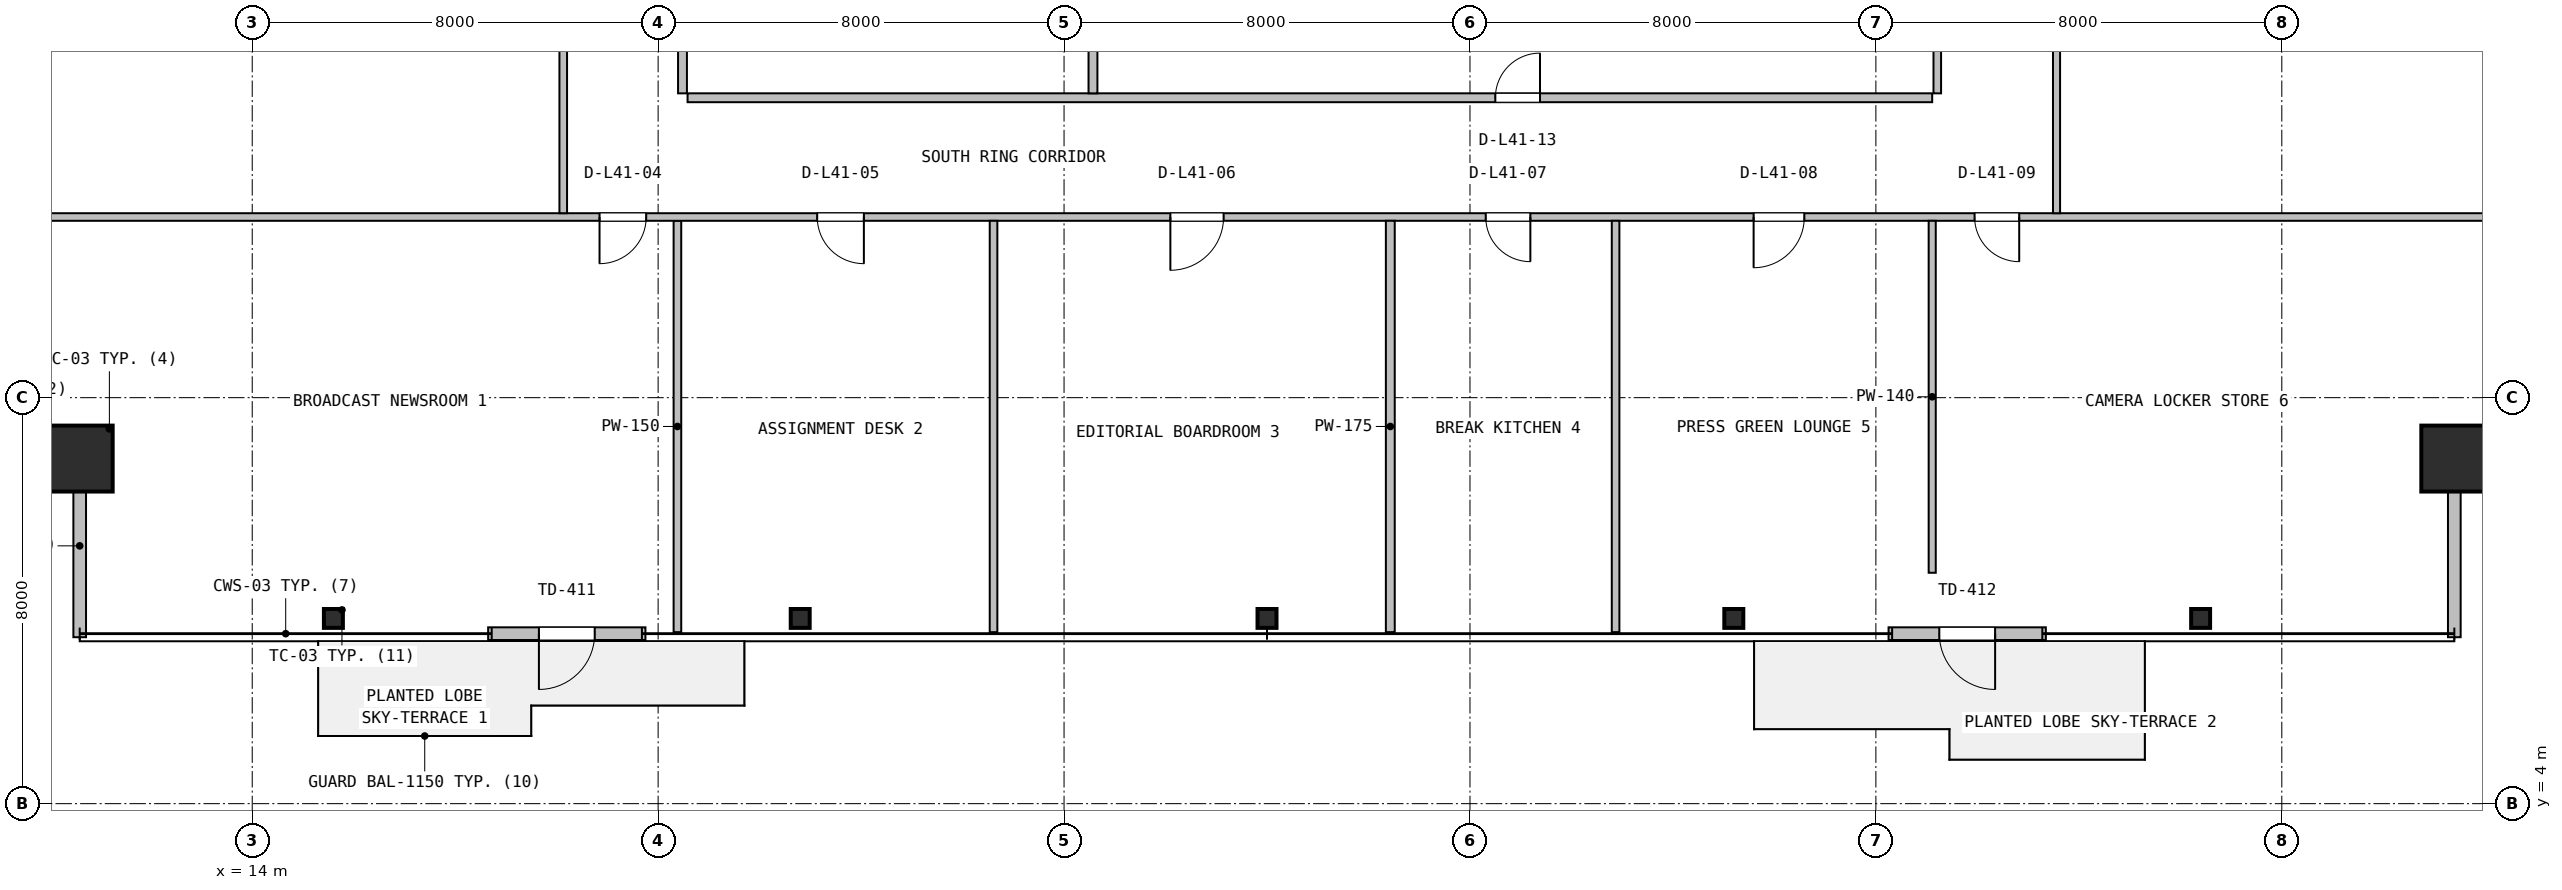
"""IFC4 building model, lengths in metres.
Left out: names, types, materials, properties, quantities, classifications, styles, units other than length and angle.
Written with IfcOpenShell. Run it as: python <this file> out.ifc"""

import sys

from ifc_helpers import new_model, si_unit, direction, frame, frame_2d, origin, origin_2d, place, context, subcontext, project, spatial, rectangle, hollow_rectangle, i_section, extrude, source, transform, mapped, element, fill, save


model = new_model("IFC4")
c1 = context("Model", 3, precision=1e-05, world=origin(), true_north=direction((0.0, 1.0)))
c2 = subcontext(c1, "Body", "Model", "MODEL_VIEW")
j1 = project(units=[si_unit("LENGTHUNIT", "METRE"), si_unit("PLANEANGLEUNIT", "RADIAN")], contexts=[c1])
p1 = place(None, origin())
s1 = spatial("IfcSite", under=j1, at=p1, CompositionType="ELEMENT")
p2 = place(p1, origin())
s2 = spatial("IfcBuilding", under=s1, at=p2, CompositionType="ELEMENT")
p3 = place(p2, frame((0.0, 0.0, 168.6)))
s3 = spatial("IfcBuildingStorey", under=s2, at=p3, CompositionType="ELEMENT", Elevation=168.6)
m1 = source(origin(), c2, "Body", "SweptSolid", [
    extrude(hollow_rectangle(XDim=1.3, YDim=1.3, WallThickness=0.05, at=origin_2d()), origin(), (0.0, 0.0, 1.0), 3.8),
])
for number, where, z_axis, x_axis in (
    (1, (10.6, 10.8, 0.0), (0.0, 0.0, 1.0), (1.0, 0.0, 0.0)),
    (2, (57.4, 10.8, 0.0), (0.0, 0.0, 1.0), (1.0, 0.0, 0.0)),
):
    element("IfcColumn", number, at=place(p3, frame(where, z_axis=z_axis, x_axis=x_axis)), inside=s3, PredefinedType="COLUMN", context=c2, shape_type="MappedRepresentation", body=[
        mapped(m1, transform((0.0, 0.0, 0.0), x_axis=(1.0, 0.0, 0.0), y_axis=(0.0, 1.0, 0.0), z_axis=(0.0, 0.0, 1.0), scale=1.0)),
    ])
m2 = source(origin(), c2, "Body", "SweptSolid", [
    extrude(i_section(OverallWidth=0.374, OverallDepth=0.372, WebThickness=0.016, FlangeThickness=0.026, FilletRadius=0.016, at=origin_2d()), origin(), (0.0, 0.0, 1.0), 3.8),
])
for number, where, z_axis, x_axis in (
    (3, (15.6, 7.65, 0.0), (0.0, 0.0, 1.0), (1.0, 0.0, 0.0)),
    (4, (24.8, 7.65, 0.0), (0.0, 0.0, 1.0), (1.0, 0.0, 0.0)),
    (5, (34.0, 7.65, 0.0), (0.0, 0.0, 1.0), (1.0, 0.0, 0.0)),
    (6, (43.2, 7.65, 0.0), (0.0, 0.0, 1.0), (1.0, 0.0, 0.0)),
    (7, (52.4, 7.65, 0.0), (0.0, 0.0, 1.0), (1.0, 0.0, 0.0)),
):
    element("IfcColumn", number, at=place(p3, frame(where, z_axis=z_axis, x_axis=x_axis)), inside=s3, PredefinedType="COLUMN", context=c2, shape_type="MappedRepresentation", body=[
        mapped(m2, transform((0.0, 0.0, 0.0), x_axis=(1.0, 0.0, 0.0), y_axis=(0.0, 1.0, 0.0), z_axis=(0.0, 0.0, 1.0), scale=1.0)),
    ])
p4 = place(p3, frame((18.65, 7.35, 0.0), z_axis=(0.0, 0.0, 1.0), x_axis=(1.0, 0.0, 0.0)))
e8 = element("IfcWall", 8, at=p4, inside=s3, PredefinedType="SOLIDWALL", context=c2, shape_type="SweptSolid", body=[
    extrude(rectangle(XDim=3.1, YDim=0.25, at=frame_2d((1.55, 0.0))), origin(), (0.0, 0.0, 1.0), 3.53),
])
p5 = place(p4, frame((1.0, 0.0, 0.0)))
e9 = element("IfcOpeningElement", 9, at=p5, cuts=e8, PredefinedType="OPENING", context=c2, shape_type="SweptSolid", body=[
    extrude(rectangle(XDim=1.1, YDim=2.15, at=frame_2d((0.55, 1.075))), frame((0.0, 0.135, 0.0), z_axis=(0.0, -1.0, 0.0), x_axis=(1.0, 0.0, 0.0)), (0.0, 0.0, 1.0), 0.27),
])
p6 = place(p3, frame((46.25, 7.35, 0.0), z_axis=(0.0, 0.0, 1.0), x_axis=(1.0, 0.0, 0.0)))
e10 = element("IfcWall", 10, at=p6, inside=s3, PredefinedType="SOLIDWALL", context=c2, shape_type="SweptSolid", body=[
    extrude(rectangle(XDim=3.1, YDim=0.25, at=frame_2d((1.55, 0.0))), origin(), (0.0, 0.0, 1.0), 3.53),
])
p7 = place(p6, frame((1.0, 0.0, 0.0)))
e11 = element("IfcOpeningElement", 11, at=p7, cuts=e10, PredefinedType="OPENING", context=c2, shape_type="SweptSolid", body=[
    extrude(rectangle(XDim=1.1, YDim=2.15, at=frame_2d((0.55, 1.075))), frame((0.0, 0.135, 0.0), z_axis=(0.0, -1.0, 0.0), x_axis=(1.0, 0.0, 0.0)), (0.0, 0.0, 1.0), 0.27),
])
for number, where, z_axis, x_axis in (
    (12, (10.6, 7.28, 0.0), (0.0, 0.0, 1.0), (0.0, 1.0, 0.0)),
    (13, (57.4, 7.28, 0.0), (0.0, 0.0, 1.0), (0.0, 1.0, 0.0)),
):
    element("IfcWall", number, at=place(p3, frame(where, z_axis=z_axis, x_axis=x_axis)), inside=s3, PredefinedType="SOLIDWALL", context=c2, shape_type="SweptSolid", body=[
        extrude(rectangle(XDim=3.6, YDim=0.25, at=frame_2d((1.8, 0.0))), origin(), (0.0, 0.0, 1.0), 3.108),
    ])
p8 = place(p3, frame((22.38, 7.38, 0.0), z_axis=(0.0, 0.0, 1.0), x_axis=(0.0, 1.0, 0.0)))
e14 = element("IfcWall", 14, at=p8, inside=s3, PredefinedType="PARTITIONING", context=c2, shape_type="SweptSolid", body=[
    extrude(rectangle(XDim=8.105, YDim=0.15, at=frame_2d((4.053, 0.0))), origin(), (0.0, 0.0, 1.0), 3.108),
])
p9 = place(p3, frame((7.18, 15.56, 0.0), z_axis=(0.0, 0.0, 1.0), x_axis=(1.0, 0.0, 0.0)))
e15 = element("IfcWall", 15, at=p9, inside=s3, PredefinedType="PARTITIONING", context=c2, shape_type="SweptSolid", body=[
    extrude(rectangle(XDim=53.64, YDim=0.15, at=frame_2d((26.82, 0.0))), origin(), (0.0, 0.0, 1.0), 2.909),
])
p10 = place(p9, frame((13.665, 0.0, 0.0)))
e16 = element("IfcOpeningElement", 16, at=p10, cuts=e15, PredefinedType="OPENING", context=c2, shape_type="SweptSolid", body=[
    extrude(rectangle(XDim=0.92, YDim=2.08, at=frame_2d((0.46, 1.04))), frame((0.0, 0.085, 0.0), z_axis=(0.0, -1.0, 0.0), x_axis=(1.0, 0.0, 0.0)), (0.0, 0.0, 1.0), 0.17),
])
p11 = place(p9, frame((17.955, 0.0, 0.0)))
e17 = element("IfcOpeningElement", 17, at=p11, cuts=e15, PredefinedType="OPENING", context=c2, shape_type="SweptSolid", body=[
    extrude(rectangle(XDim=0.92, YDim=2.08, at=frame_2d((0.46, 1.04))), frame((0.0, 0.085, 0.0), z_axis=(0.0, -1.0, 0.0), x_axis=(1.0, 0.0, 0.0)), (0.0, 0.0, 1.0), 0.17),
])
p12 = place(p9, frame((24.915, 0.0, 0.0)))
e18 = element("IfcOpeningElement", 18, at=p12, cuts=e15, PredefinedType="OPENING", context=c2, shape_type="SweptSolid", body=[
    extrude(rectangle(XDim=1.05, YDim=2.1, at=frame_2d((0.525, 1.05))), frame((0.0, 0.085, 0.0), z_axis=(0.0, -1.0, 0.0), x_axis=(1.0, 0.0, 0.0)), (0.0, 0.0, 1.0), 0.17),
])
p13 = place(p9, frame((31.13, 0.0, 0.0)))
e19 = element("IfcOpeningElement", 19, at=p13, cuts=e15, PredefinedType="OPENING", context=c2, shape_type="SweptSolid", body=[
    extrude(rectangle(XDim=0.88, YDim=2.06, at=frame_2d((0.44, 1.03))), frame((0.0, 0.085, 0.0), z_axis=(0.0, -1.0, 0.0), x_axis=(1.0, 0.0, 0.0)), (0.0, 0.0, 1.0), 0.17),
])
p14 = place(p9, frame((36.41, 0.0, 0.0)))
e20 = element("IfcOpeningElement", 20, at=p14, cuts=e15, PredefinedType="OPENING", context=c2, shape_type="SweptSolid", body=[
    extrude(rectangle(XDim=1.0, YDim=2.1, at=frame_2d((0.5, 1.05))), frame((0.0, 0.085, 0.0), z_axis=(0.0, -1.0, 0.0), x_axis=(1.0, 0.0, 0.0)), (0.0, 0.0, 1.0), 0.17),
])
p15 = place(p9, frame((40.765, 0.0, 0.0)))
e21 = element("IfcOpeningElement", 21, at=p15, cuts=e15, PredefinedType="OPENING", context=c2, shape_type="SweptSolid", body=[
    extrude(rectangle(XDim=0.88, YDim=2.06, at=frame_2d((0.44, 1.03))), frame((0.0, 0.085, 0.0), z_axis=(0.0, -1.0, 0.0), x_axis=(1.0, 0.0, 0.0)), (0.0, 0.0, 1.0), 0.17),
])
p16 = place(p3, frame((28.61, 7.38, 0.0), z_axis=(0.0, 0.0, 1.0), x_axis=(0.0, 1.0, 0.0)))
e22 = element("IfcWall", 22, at=p16, inside=s3, PredefinedType="PARTITIONING", context=c2, shape_type="SweptSolid", body=[
    extrude(rectangle(XDim=8.105, YDim=0.15, at=frame_2d((4.053, 0.0))), origin(), (0.0, 0.0, 1.0), 3.108),
])
p17 = place(p3, frame((36.43, 7.38, 0.0), z_axis=(0.0, 0.0, 1.0), x_axis=(0.0, 1.0, 0.0)))
e23 = element("IfcWall", 23, at=p17, inside=s3, PredefinedType="PARTITIONING", context=c2, shape_type="SweptSolid", body=[
    extrude(rectangle(XDim=8.105, YDim=0.175, at=frame_2d((4.053, 0.0))), origin(), (0.0, 0.0, 1.0), 3.108),
])
p18 = place(p3, frame((40.87, 7.38, 0.0), z_axis=(0.0, 0.0, 1.0), x_axis=(0.0, 1.0, 0.0)))
e24 = element("IfcWall", 24, at=p18, inside=s3, PredefinedType="PARTITIONING", context=c2, shape_type="SweptSolid", body=[
    extrude(rectangle(XDim=8.105, YDim=0.15, at=frame_2d((4.053, 0.0))), origin(), (0.0, 0.0, 1.0), 3.108),
])
p19 = place(p3, frame((47.11, 8.55, 0.0), z_axis=(0.0, 0.0, 1.0), x_axis=(0.0, 1.0, 0.0)))
e25 = element("IfcWall", 25, at=p19, inside=s3, PredefinedType="PARTITIONING", context=c2, shape_type="SweptSolid", body=[
    extrude(rectangle(XDim=6.935, YDim=0.14, at=frame_2d((3.468, 0.0))), origin(), (0.0, 0.0, 1.0), 3.222),
])
p20 = place(p3, frame((20.13, 15.635, 0.0), z_axis=(0.0, 0.0, 1.0), x_axis=(0.0, 1.0, 0.0)))
e26 = element("IfcWall", 26, at=p20, inside=s3, PredefinedType="PARTITIONING", context=c2, shape_type="SweptSolid", body=[
    extrude(rectangle(XDim=17.64, YDim=0.15, at=frame_2d((8.82, 0.0))), origin(), (0.0, 0.0, 1.0), 3.222),
])
p21 = place(p20, frame((5.41, 0.0, 0.0)))
e27 = element("IfcOpeningElement", 27, at=p21, cuts=e26, PredefinedType="OPENING", context=c2, shape_type="SweptSolid", body=[
    extrude(rectangle(XDim=0.92, YDim=2.08, at=frame_2d((0.46, 1.04))), frame((0.0, 0.085, 0.0), z_axis=(0.0, -1.0, 0.0), x_axis=(1.0, 0.0, 0.0)), (0.0, 0.0, 1.0), 0.17),
])
p22 = place(p3, frame((22.58, 17.91, 0.0), z_axis=(0.0, 0.0, 1.0), x_axis=(1.0, 0.0, 0.0)))
e28 = element("IfcWall", 28, at=p22, inside=s3, PredefinedType="PARTITIONING", context=c2, shape_type="SweptSolid", body=[
    extrude(rectangle(XDim=24.53, YDim=0.175, at=frame_2d((12.265, 0.0))), origin(), (0.0, 0.0, 1.0), 2.909),
])
p23 = place(p22, frame((15.92, 0.0, 0.0)))
e29 = element("IfcOpeningElement", 29, at=p23, cuts=e28, PredefinedType="OPENING", context=c2, shape_type="SweptSolid", body=[
    extrude(rectangle(XDim=0.88, YDim=2.06, at=frame_2d((0.44, 1.03))), frame((0.0, 0.098, 0.0), z_axis=(0.0, -1.0, 0.0), x_axis=(1.0, 0.0, 0.0)), (0.0, 0.0, 1.0), 0.195),
])
p24 = place(p3, frame((30.57, 17.997, 0.0), z_axis=(0.0, 0.0, 1.0), x_axis=(0.0, 1.0, 0.0)))
e30 = element("IfcWall", 30, at=p24, inside=s3, PredefinedType="PARTITIONING", context=c2, shape_type="SweptSolid", body=[
    extrude(rectangle(XDim=15.266, YDim=0.175, at=frame_2d((7.633, 0.0))), origin(), (0.0, 0.0, 1.0), 2.909),
])
p25 = place(p3, frame((22.48, 17.997, 0.0), z_axis=(0.0, 0.0, 1.0), x_axis=(0.0, 1.0, 0.0)))
e31 = element("IfcWall", 31, at=p25, inside=s3, PredefinedType="PARTITIONING", context=c2, shape_type="SweptSolid", body=[
    extrude(rectangle(XDim=15.266, YDim=0.175, at=frame_2d((7.633, 0.0))), origin(), (0.0, 0.0, 1.0), 3.222),
])
p26 = place(p25, frame((7.108, 0.0, 0.0)))
e32 = element("IfcOpeningElement", 32, at=p26, cuts=e31, PredefinedType="OPENING", context=c2, shape_type="SweptSolid", body=[
    extrude(rectangle(XDim=1.05, YDim=2.1, at=frame_2d((0.525, 1.05))), frame((0.0, 0.098, 0.0), z_axis=(0.0, -1.0, 0.0), x_axis=(1.0, 0.0, 0.0)), (0.0, 0.0, 1.0), 0.195),
])
p27 = place(p3, frame((47.21, 17.997, 0.0), z_axis=(0.0, 0.0, 1.0), x_axis=(0.0, 1.0, 0.0)))
e33 = element("IfcWall", 33, at=p27, inside=s3, PredefinedType="PARTITIONING", context=c2, shape_type="SweptSolid", body=[
    extrude(rectangle(XDim=15.266, YDim=0.15, at=frame_2d((7.633, 0.0))), origin(), (0.0, 0.0, 1.0), 3.222),
])
p28 = place(p3, frame((49.56, 15.635, 0.0), z_axis=(0.0, 0.0, 1.0), x_axis=(0.0, 1.0, 0.0)))
e34 = element("IfcWall", 34, at=p28, inside=s3, PredefinedType="PARTITIONING", context=c2, shape_type="SweptSolid", body=[
    extrude(rectangle(XDim=17.645, YDim=0.14, at=frame_2d((8.823, 0.0))), origin(), (0.0, 0.0, 1.0), 3.222),
])
p29 = place(p28, frame((8.32, 0.0, 0.0)))
e35 = element("IfcOpeningElement", 35, at=p29, cuts=e34, PredefinedType="OPENING", context=c2, shape_type="SweptSolid", body=[
    extrude(rectangle(XDim=1.0, YDim=2.1, at=frame_2d((0.5, 1.05))), frame((0.0, 0.08, 0.0), z_axis=(0.0, -1.0, 0.0), x_axis=(1.0, 0.0, 0.0)), (0.0, 0.0, 1.0), 0.16),
])
m3 = source(origin(), c2, "Body", "SweptSolid", [
    extrude(rectangle(XDim=1.1, YDim=2.15, at=frame_2d((0.55, 1.075))), frame((0.0, 0.025, 0.0), z_axis=(0.0, -1.0, 0.0), x_axis=(1.0, 0.0, 0.0)), (0.0, 0.0, 1.0), 0.05),
])
p30 = place(p5, frame((1.1, 0.0, 0.0), z_axis=(0.0, 0.0, 1.0), x_axis=(-1.0, 0.0, 0.0)))
e36 = element("IfcDoor", 36, at=p30, inside=s3, OperationType="SINGLE_SWING_LEFT", PredefinedType="DOOR", context=c2, shape_type="MappedRepresentation", body=[
    mapped(m3, transform((0.0, 0.0, 0.0), x_axis=(1.0, 0.0, 0.0), y_axis=(0.0, 1.0, 0.0), z_axis=(0.0, 0.0, 1.0), scale=1.0)),
])
fill(e9, e36)
p31 = place(p7, frame((1.1, 0.0, 0.0), z_axis=(0.0, 0.0, 1.0), x_axis=(-1.0, 0.0, 0.0)))
e37 = element("IfcDoor", 37, at=p31, inside=s3, OperationType="SINGLE_SWING_RIGHT", PredefinedType="DOOR", context=c2, shape_type="MappedRepresentation", body=[
    mapped(m3, transform((0.0, 0.0, 0.0), x_axis=(1.0, 0.0, 0.0), y_axis=(0.0, 1.0, 0.0), z_axis=(0.0, 0.0, 1.0), scale=1.0)),
])
fill(e11, e37)
m4 = source(origin(), c2, "Body", "SweptSolid", [
    extrude(rectangle(XDim=0.92, YDim=2.08, at=frame_2d((0.46, 1.04))), frame((0.0, 0.025, 0.0), z_axis=(0.0, -1.0, 0.0), x_axis=(1.0, 0.0, 0.0)), (0.0, 0.0, 1.0), 0.05),
])
p32 = place(p10, frame((0.92, 0.0, 0.0), z_axis=(0.0, 0.0, 1.0), x_axis=(-1.0, 0.0, 0.0)))
e38 = element("IfcDoor", 38, at=p32, inside=s3, OperationType="SINGLE_SWING_LEFT", PredefinedType="DOOR", context=c2, shape_type="MappedRepresentation", body=[
    mapped(m4, transform((0.0, 0.0, 0.0), x_axis=(1.0, 0.0, 0.0), y_axis=(0.0, 1.0, 0.0), z_axis=(0.0, 0.0, 1.0), scale=1.0)),
])
fill(e16, e38)
p33 = place(p11, frame((0.92, 0.0, 0.0), z_axis=(0.0, 0.0, 1.0), x_axis=(-1.0, 0.0, 0.0)))
e39 = element("IfcDoor", 39, at=p33, inside=s3, OperationType="SINGLE_SWING_RIGHT", PredefinedType="DOOR", context=c2, shape_type="MappedRepresentation", body=[
    mapped(m4, transform((0.0, 0.0, 0.0), x_axis=(1.0, 0.0, 0.0), y_axis=(0.0, 1.0, 0.0), z_axis=(0.0, 0.0, 1.0), scale=1.0)),
])
fill(e17, e39)
m5 = source(origin(), c2, "Body", "SweptSolid", [
    extrude(rectangle(XDim=1.05, YDim=2.1, at=frame_2d((0.525, 1.05))), frame((0.0, 0.025, 0.0), z_axis=(0.0, -1.0, 0.0), x_axis=(1.0, 0.0, 0.0)), (0.0, 0.0, 1.0), 0.05),
])
p34 = place(p12, frame((1.05, 0.0, 0.0), z_axis=(0.0, 0.0, 1.0), x_axis=(-1.0, 0.0, 0.0)))
e40 = element("IfcDoor", 40, at=p34, inside=s3, OperationType="SINGLE_SWING_LEFT", PredefinedType="DOOR", context=c2, shape_type="MappedRepresentation", body=[
    mapped(m5, transform((0.0, 0.0, 0.0), x_axis=(1.0, 0.0, 0.0), y_axis=(0.0, 1.0, 0.0), z_axis=(0.0, 0.0, 1.0), scale=1.0)),
])
fill(e18, e40)
m6 = source(origin(), c2, "Body", "SweptSolid", [
    extrude(rectangle(XDim=0.88, YDim=2.06, at=frame_2d((0.44, 1.03))), frame((0.0, 0.025, 0.0), z_axis=(0.0, -1.0, 0.0), x_axis=(1.0, 0.0, 0.0)), (0.0, 0.0, 1.0), 0.05),
])
p35 = place(p13, frame((0.88, 0.0, 0.0), z_axis=(0.0, 0.0, 1.0), x_axis=(-1.0, 0.0, 0.0)))
e41 = element("IfcDoor", 41, at=p35, inside=s3, OperationType="SINGLE_SWING_RIGHT", PredefinedType="DOOR", context=c2, shape_type="MappedRepresentation", body=[
    mapped(m6, transform((0.0, 0.0, 0.0), x_axis=(1.0, 0.0, 0.0), y_axis=(0.0, 1.0, 0.0), z_axis=(0.0, 0.0, 1.0), scale=1.0)),
])
fill(e19, e41)
m7 = source(origin(), c2, "Body", "SweptSolid", [
    extrude(rectangle(XDim=1.0, YDim=2.1, at=frame_2d((0.5, 1.05))), frame((0.0, 0.025, 0.0), z_axis=(0.0, -1.0, 0.0), x_axis=(1.0, 0.0, 0.0)), (0.0, 0.0, 1.0), 0.05),
])
p36 = place(p14, frame((1.0, 0.0, 0.0), z_axis=(0.0, 0.0, 1.0), x_axis=(-1.0, 0.0, 0.0)))
e42 = element("IfcDoor", 42, at=p36, inside=s3, OperationType="SINGLE_SWING_LEFT", PredefinedType="DOOR", context=c2, shape_type="MappedRepresentation", body=[
    mapped(m7, transform((0.0, 0.0, 0.0), x_axis=(1.0, 0.0, 0.0), y_axis=(0.0, 1.0, 0.0), z_axis=(0.0, 0.0, 1.0), scale=1.0)),
])
fill(e20, e42)
p37 = place(p15, frame((0.88, 0.0, 0.0), z_axis=(0.0, 0.0, 1.0), x_axis=(-1.0, 0.0, 0.0)))
e43 = element("IfcDoor", 43, at=p37, inside=s3, OperationType="SINGLE_SWING_RIGHT", PredefinedType="DOOR", context=c2, shape_type="MappedRepresentation", body=[
    mapped(m6, transform((0.0, 0.0, 0.0), x_axis=(1.0, 0.0, 0.0), y_axis=(0.0, 1.0, 0.0), z_axis=(0.0, 0.0, 1.0), scale=1.0)),
])
fill(e21, e43)
p38 = place(p23, origin())
e44 = element("IfcDoor", 44, at=p38, inside=s3, OperationType="SINGLE_SWING_RIGHT", PredefinedType="DOOR", context=c2, shape_type="MappedRepresentation", body=[
    mapped(m6, transform((0.0, 0.0, 0.0), x_axis=(1.0, 0.0, 0.0), y_axis=(0.0, 1.0, 0.0), z_axis=(0.0, 0.0, 1.0), scale=1.0)),
])
fill(e29, e44)
save(model, sys.argv[1])
